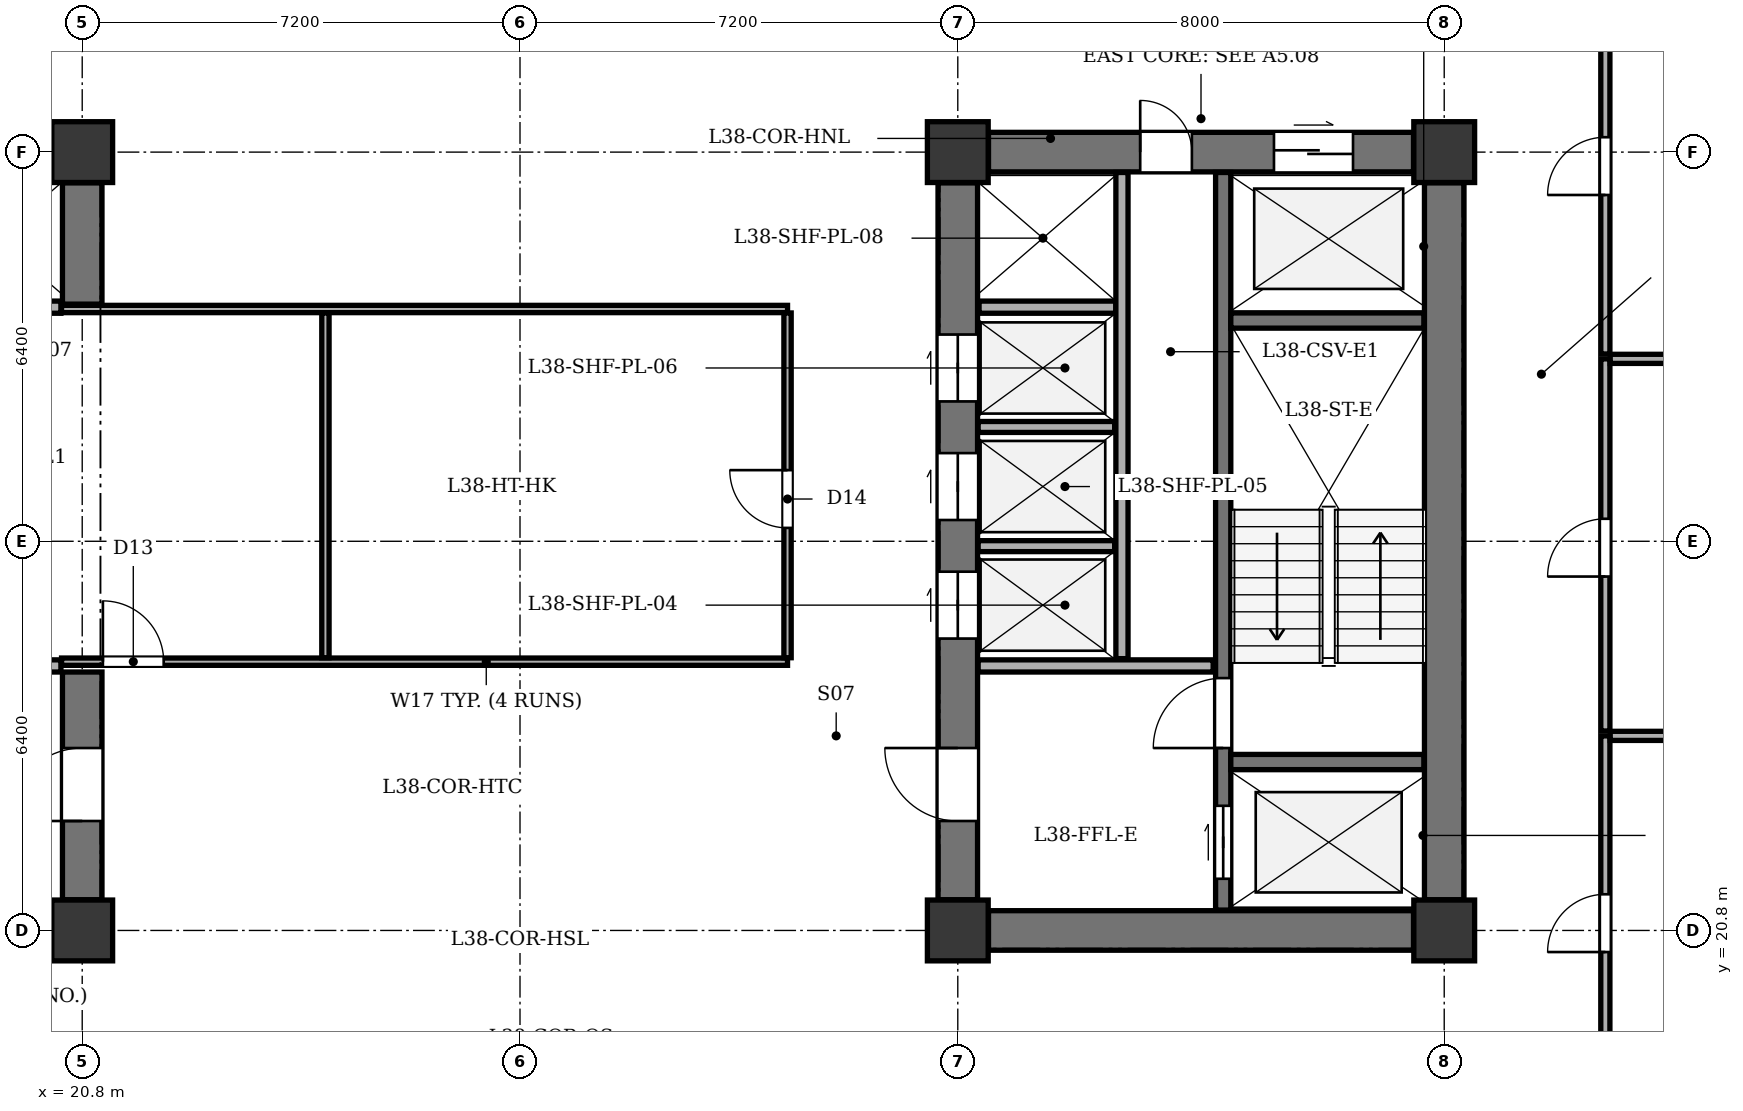
"""IFC4 building model, lengths in metres.
Left out: names, types, materials, properties, quantities, classifications, styles, units other than length and angle.
Written with IfcOpenShell. Run it as: python <this file> out.ifc"""

import sys

from ifc_helpers import new_model, si_unit, direction, frame, frame_2d, origin, origin_2d, place, context, subcontext, project, spatial, rectangle, extrude, element, fill, save


model = new_model("IFC4")
c1 = context("Model", 3, precision=1e-05, world=origin(), true_north=direction((0.0, 1.0)))
c2 = subcontext(c1, "Body", "Model", "MODEL_VIEW")
j1 = project(units=[si_unit("LENGTHUNIT", "METRE"), si_unit("PLANEANGLEUNIT", "RADIAN")], contexts=[c1])
p1 = place(None, origin())
s1 = spatial("IfcSite", under=j1, at=p1, CompositionType="ELEMENT")
p2 = place(p1, origin())
s2 = spatial("IfcBuilding", under=s1, at=p2, CompositionType="ELEMENT")
p3 = place(p2, frame((0.0, 0.0, 151.8)))
s3 = spatial("IfcBuildingStorey", under=s2, at=p3, CompositionType="ELEMENT", Elevation=151.8)
for number, where, z_axis, x_axis in (
    (1, (20.8, 20.8, 0.0), (0.0, 0.0, 1.0), (1.0, 0.0, 0.0)),
    (2, (20.8, 33.6, 0.0), (0.0, 0.0, 1.0), (1.0, 0.0, 0.0)),
    (3, (35.2, 20.8, 0.0), (0.0, 0.0, 1.0), (1.0, 0.0, 0.0)),
    (4, (43.2, 20.8, 0.0), (0.0, 0.0, 1.0), (1.0, 0.0, 0.0)),
    (5, (35.2, 33.6, 0.0), (0.0, 0.0, 1.0), (1.0, 0.0, 0.0)),
    (6, (43.2, 33.6, 0.0), (0.0, 0.0, 1.0), (1.0, 0.0, 0.0)),
):
    element("IfcColumn", number, at=place(p3, frame(where, z_axis=z_axis, x_axis=x_axis)), inside=s3, PredefinedType="COLUMN", context=c2, shape_type="SweptSolid", body=[
        extrude(rectangle(XDim=1.0, YDim=1.0, at=origin_2d()), origin(), (0.0, 0.0, 1.0), 3.5),
    ])
p4 = place(p3, frame((20.8, 21.305, 0.0), z_axis=(0.0, 0.0, 1.0), x_axis=(0.0, 1.0, 0.0)))
e7 = element("IfcWall", 7, at=p4, inside=s3, PredefinedType="SHEAR", context=c2, shape_type="SweptSolid", body=[
    extrude(rectangle(XDim=3.745, YDim=0.65, at=frame_2d((1.873, 0.0))), origin(), (0.0, 0.0, 1.0), 3.2),
])
p5 = place(p4, frame((1.295, 0.0, 0.0)))
e8 = element("IfcOpeningElement", 8, at=p5, cuts=e7, PredefinedType="OPENING", context=c2, shape_type="SweptSolid", body=[
    extrude(rectangle(XDim=1.2, YDim=2.15, at=frame_2d((0.6, 1.075))), frame((0.0, 0.335, 0.0), z_axis=(0.0, -1.0, 0.0), x_axis=(1.0, 0.0, 0.0)), (0.0, 0.0, 1.0), 0.67),
])
p6 = place(p3, frame((20.8, 31.1, 0.0), z_axis=(0.0, 0.0, 1.0), x_axis=(0.0, 1.0, 0.0)))
e9 = element("IfcWall", 9, at=p6, inside=s3, PredefinedType="SHEAR", context=c2, shape_type="SweptSolid", body=[
    extrude(rectangle(XDim=1.995, YDim=0.65, at=frame_2d((0.998, 0.0))), origin(), (0.0, 0.0, 1.0), 3.2),
])
for number, where, z_axis, x_axis in (
    (10, (16.6, 25.15, 0.0), (0.0, 0.0, 1.0), (1.0, 0.0, 0.0)),
    (11, (16.6, 31.05, 0.0), (0.0, 0.0, 1.0), (1.0, 0.0, 0.0)),
):
    element("IfcWall", number, at=place(p3, frame(where, z_axis=z_axis, x_axis=x_axis)), inside=s3, PredefinedType="SOLIDWALL", context=c2, shape_type="SweptSolid", body=[
        extrude(rectangle(XDim=3.85, YDim=0.2, at=frame_2d((1.925, 0.0))), origin(), (0.0, 0.0, 1.0), 3.2),
    ])
p7 = place(p3, frame((43.2, 21.305, 0.0), z_axis=(0.0, 0.0, 1.0), x_axis=(0.0, 1.0, 0.0)))
e12 = element("IfcWall", 12, at=p7, inside=s3, PredefinedType="SHEAR", context=c2, shape_type="SweptSolid", body=[
    extrude(rectangle(XDim=11.79, YDim=0.65, at=frame_2d((5.895, 0.0))), origin(), (0.0, 0.0, 1.0), 3.2),
])
p8 = place(p3, frame((35.705, 20.8, 0.0), z_axis=(0.0, 0.0, 1.0), x_axis=(1.0, 0.0, 0.0)))
e13 = element("IfcWall", 13, at=p8, inside=s3, PredefinedType="SHEAR", context=c2, shape_type="SweptSolid", body=[
    extrude(rectangle(XDim=6.99, YDim=0.65, at=frame_2d((3.495, 0.0))), origin(), (0.0, 0.0, 1.0), 3.2),
])
p9 = place(p3, frame((35.705, 33.6, 0.0), z_axis=(0.0, 0.0, 1.0), x_axis=(1.0, 0.0, 0.0)))
e14 = element("IfcWall", 14, at=p9, inside=s3, PredefinedType="SHEAR", context=c2, shape_type="SweptSolid", body=[
    extrude(rectangle(XDim=6.99, YDim=0.65, at=frame_2d((3.495, 0.0))), origin(), (0.0, 0.0, 1.0), 3.2),
])
p10 = place(p9, frame((4.695, 0.0, 0.0)))
e15 = element("IfcOpeningElement", 15, at=p10, cuts=e14, PredefinedType="OPENING", context=c2, shape_type="SweptSolid", body=[
    extrude(rectangle(XDim=1.3, YDim=2.15, at=frame_2d((0.65, 1.075))), frame((0.0, 0.335, 0.0), z_axis=(0.0, -1.0, 0.0), x_axis=(1.0, 0.0, 0.0)), (0.0, 0.0, 1.0), 0.67),
])
p11 = place(p9, frame((2.495, 0.0, 0.0)))
e16 = element("IfcOpeningElement", 16, at=p11, cuts=e14, PredefinedType="OPENING", context=c2, shape_type="SweptSolid", body=[
    extrude(rectangle(XDim=0.85, YDim=2.02, at=frame_2d((0.425, 1.01))), frame((0.0, 0.335, 0.0), z_axis=(0.0, -1.0, 0.0), x_axis=(1.0, 0.0, 0.0)), (0.0, 0.0, 1.0), 0.67),
])
p12 = place(p3, frame((35.2, 21.305, 0.0), z_axis=(0.0, 0.0, 1.0), x_axis=(0.0, 1.0, 0.0)))
e17 = element("IfcWall", 17, at=p12, inside=s3, PredefinedType="SHEAR", context=c2, shape_type="SweptSolid", body=[
    extrude(rectangle(XDim=11.79, YDim=0.65, at=frame_2d((5.895, 0.0))), origin(), (0.0, 0.0, 1.0), 3.2),
])
p13 = place(p12, frame((1.295, 0.0, 0.0)))
e18 = element("IfcOpeningElement", 18, at=p13, cuts=e17, PredefinedType="OPENING", context=c2, shape_type="SweptSolid", body=[
    extrude(rectangle(XDim=1.2, YDim=2.15, at=frame_2d((0.6, 1.075))), frame((0.0, 0.335, 0.0), z_axis=(0.0, -1.0, 0.0), x_axis=(1.0, 0.0, 0.0)), (0.0, 0.0, 1.0), 0.67),
])
p14 = place(p12, frame((4.295, 0.0, 0.0)))
e19 = element("IfcOpeningElement", 19, at=p14, cuts=e17, PredefinedType="OPENING", context=c2, shape_type="SweptSolid", body=[
    extrude(rectangle(XDim=1.1, YDim=2.1, at=frame_2d((0.55, 1.05))), frame((0.0, 0.335, 0.0), z_axis=(0.0, -1.0, 0.0), x_axis=(1.0, 0.0, 0.0)), (0.0, 0.0, 1.0), 0.67),
])
p15 = place(p12, frame((6.245, 0.0, 0.0)))
e20 = element("IfcOpeningElement", 20, at=p15, cuts=e17, PredefinedType="OPENING", context=c2, shape_type="SweptSolid", body=[
    extrude(rectangle(XDim=1.1, YDim=2.1, at=frame_2d((0.55, 1.05))), frame((0.0, 0.335, 0.0), z_axis=(0.0, -1.0, 0.0), x_axis=(1.0, 0.0, 0.0)), (0.0, 0.0, 1.0), 0.67),
])
p16 = place(p12, frame((8.195, 0.0, 0.0)))
e21 = element("IfcOpeningElement", 21, at=p16, cuts=e17, PredefinedType="OPENING", context=c2, shape_type="SweptSolid", body=[
    extrude(rectangle(XDim=1.1, YDim=2.1, at=frame_2d((0.55, 1.05))), frame((0.0, 0.335, 0.0), z_axis=(0.0, -1.0, 0.0), x_axis=(1.0, 0.0, 0.0)), (0.0, 0.0, 1.0), 0.67),
])
p17 = place(p3, frame((39.565, 21.135, 0.0), z_axis=(0.0, 0.0, 1.0), x_axis=(0.0, 1.0, 0.0)))
e22 = element("IfcWall", 22, at=p17, inside=s3, PredefinedType="SHEAR", context=c2, shape_type="SweptSolid", body=[
    extrude(rectangle(XDim=12.13, YDim=0.25, at=frame_2d((6.065, 0.0))), origin(), (0.0, 0.0, 1.0), 3.2),
])
p18 = place(p17, frame((0.515, 0.0, 0.0)))
e23 = element("IfcOpeningElement", 23, at=p18, cuts=e22, PredefinedType="OPENING", context=c2, shape_type="SweptSolid", body=[
    extrude(rectangle(XDim=1.2, YDim=2.15, at=frame_2d((0.6, 1.075))), frame((0.0, 0.135, 0.0), z_axis=(0.0, -1.0, 0.0), x_axis=(1.0, 0.0, 0.0)), (0.0, 0.0, 1.0), 0.27),
])
p19 = place(p17, frame((2.665, 0.0, 0.0)))
e24 = element("IfcOpeningElement", 24, at=p19, cuts=e22, PredefinedType="OPENING", context=c2, shape_type="SweptSolid", body=[
    extrude(rectangle(XDim=1.15, YDim=2.15, at=frame_2d((0.575, 1.075))), frame((0.0, 0.135, 0.0), z_axis=(0.0, -1.0, 0.0), x_axis=(1.0, 0.0, 0.0)), (0.0, 0.0, 1.0), 0.27),
])
for number, where, z_axis, x_axis in (
    (25, (39.69, 23.57, 0.0), (0.0, 0.0, 1.0), (1.0, 0.0, 0.0)),
    (26, (39.69, 30.83, 0.0), (0.0, 0.0, 1.0), (1.0, 0.0, 0.0)),
):
    element("IfcWall", number, at=place(p3, frame(where, z_axis=z_axis, x_axis=x_axis)), inside=s3, PredefinedType="SHEAR", context=c2, shape_type="SweptSolid", body=[
        extrude(rectangle(XDim=3.175, YDim=0.25, at=frame_2d((1.587, 0.0))), origin(), (0.0, 0.0, 1.0), 3.2),
    ])
p20 = place(p3, frame((35.535, 25.15, 0.0), z_axis=(0.0, 0.0, 1.0), x_axis=(1.0, 0.0, 0.0)))
e27 = element("IfcWall", 27, at=p20, inside=s3, PredefinedType="SOLIDWALL", context=c2, shape_type="SweptSolid", body=[
    extrude(rectangle(XDim=3.865, YDim=0.2, at=frame_2d((1.933, 0.0))), origin(), (0.0, 0.0, 1.0), 3.2),
])
p21 = place(p3, frame((35.55, 31.05, 0.0), z_axis=(0.0, 0.0, 1.0), x_axis=(1.0, 0.0, 0.0)))
e28 = element("IfcWall", 28, at=p21, inside=s3, PredefinedType="SOLIDWALL", context=c2, shape_type="SweptSolid", body=[
    extrude(rectangle(XDim=2.25, YDim=0.2, at=frame_2d((1.125, 0.0))), origin(), (0.0, 0.0, 1.0), 3.2),
])
p22 = place(p3, frame((37.9, 25.27, 0.0), z_axis=(0.0, 0.0, 1.0), x_axis=(0.0, 1.0, 0.0)))
e29 = element("IfcWall", 29, at=p22, inside=s3, PredefinedType="SOLIDWALL", context=c2, shape_type="SweptSolid", body=[
    extrude(rectangle(XDim=7.995, YDim=0.2, at=frame_2d((3.998, 0.0))), origin(), (0.0, 0.0, 1.0), 3.2),
])
for number, where, z_axis, x_axis in (
    (30, (35.535, 27.12, 0.0), (0.0, 0.0, 1.0), (1.0, 0.0, 0.0)),
    (31, (35.535, 29.08, 0.0), (0.0, 0.0, 1.0), (1.0, 0.0, 0.0)),
):
    element("IfcWall", number, at=place(p3, frame(where, z_axis=z_axis, x_axis=x_axis)), inside=s3, PredefinedType="PARTITIONING", context=c2, shape_type="SweptSolid", body=[
        extrude(rectangle(XDim=2.245, YDim=0.18, at=frame_2d((1.123, 0.0))), origin(), (0.0, 0.0, 1.0), 3.2),
    ])
p23 = place(p3, frame((20.46, 25.22, 0.0), z_axis=(0.0, 0.0, 1.0), x_axis=(1.0, 0.0, 0.0)))
e32 = element("IfcWall", 32, at=p23, inside=s3, PredefinedType="PARTITIONING", context=c2, shape_type="SweptSolid", body=[
    extrude(rectangle(XDim=11.94, YDim=0.12, at=frame_2d((5.97, 0.0))), origin(), (0.0, 0.0, 1.0), 3.2),
])
p24 = place(p23, frame((0.68, 0.0, 0.0)))
e33 = element("IfcOpeningElement", 33, at=p24, cuts=e32, PredefinedType="OPENING", context=c2, shape_type="SweptSolid", body=[
    extrude(rectangle(XDim=1.0, YDim=2.1, at=frame_2d((0.5, 1.05))), frame((0.0, 0.07, 0.0), z_axis=(0.0, -1.0, 0.0), x_axis=(1.0, 0.0, 0.0)), (0.0, 0.0, 1.0), 0.14),
])
p25 = place(p3, frame((20.46, 31.02, 0.0), z_axis=(0.0, 0.0, 1.0), x_axis=(1.0, 0.0, 0.0)))
e34 = element("IfcWall", 34, at=p25, inside=s3, PredefinedType="PARTITIONING", context=c2, shape_type="SweptSolid", body=[
    extrude(rectangle(XDim=11.94, YDim=0.12, at=frame_2d((5.97, 0.0))), origin(), (0.0, 0.0, 1.0), 3.2),
])
p26 = place(p3, frame((32.4, 25.285, 0.0), z_axis=(0.0, 0.0, 1.0), x_axis=(0.0, 1.0, 0.0)))
e35 = element("IfcWall", 35, at=p26, inside=s3, PredefinedType="PARTITIONING", context=c2, shape_type="SweptSolid", body=[
    extrude(rectangle(XDim=5.67, YDim=0.12, at=frame_2d((2.835, 0.0))), origin(), (0.0, 0.0, 1.0), 3.2),
])
p27 = place(p26, frame((2.135, 0.0, 0.0)))
e36 = element("IfcOpeningElement", 36, at=p27, cuts=e35, PredefinedType="OPENING", context=c2, shape_type="SweptSolid", body=[
    extrude(rectangle(XDim=0.95, YDim=2.1, at=frame_2d((0.475, 1.05))), frame((0.0, 0.07, 0.0), z_axis=(0.0, -1.0, 0.0), x_axis=(1.0, 0.0, 0.0)), (0.0, 0.0, 1.0), 0.14),
])
p28 = place(p3, frame((24.8, 25.285, 0.0), z_axis=(0.0, 0.0, 1.0), x_axis=(0.0, 1.0, 0.0)))
e37 = element("IfcWall", 37, at=p28, inside=s3, PredefinedType="PARTITIONING", context=c2, shape_type="SweptSolid", body=[
    extrude(rectangle(XDim=5.67, YDim=0.12, at=frame_2d((2.835, 0.0))), origin(), (0.0, 0.0, 1.0), 3.2),
])
p29 = place(p3, frame((45.85, 17.93, 0.0), z_axis=(0.0, 0.0, 1.0), x_axis=(0.0, 1.0, 0.0)))
e38 = element("IfcWall", 38, at=p29, inside=s3, PredefinedType="PARTITIONING", context=c2, shape_type="SweptSolid", body=[
    extrude(rectangle(XDim=6.07, YDim=0.15, at=frame_2d((3.035, 0.0))), origin(), (0.0, 0.0, 1.0), 3.2),
])
p30 = place(p29, frame((2.515, 0.0, 0.0)))
e39 = element("IfcOpeningElement", 39, at=p30, cuts=e38, PredefinedType="OPENING", context=c2, shape_type="SweptSolid", body=[
    extrude(rectangle(XDim=0.95, YDim=2.1, at=frame_2d((0.475, 1.05))), frame((0.0, 0.085, 0.0), z_axis=(0.0, -1.0, 0.0), x_axis=(1.0, 0.0, 0.0)), (0.0, 0.0, 1.0), 0.17),
])
p31 = place(p3, frame((45.93, 24.0, 0.0), z_axis=(0.0, 0.0, 1.0), x_axis=(1.0, 0.0, 0.0)))
e40 = element("IfcWall", 40, at=p31, inside=s3, PredefinedType="PARTITIONING", context=c2, shape_type="SweptSolid", body=[
    extrude(rectangle(XDim=9.395, YDim=0.15, at=frame_2d((4.698, 0.0))), origin(), (0.0, 0.0, 1.0), 3.2),
])
p32 = place(p3, frame((45.85, 24.08, 0.0), z_axis=(0.0, 0.0, 1.0), x_axis=(0.0, 1.0, 0.0)))
e41 = element("IfcWall", 41, at=p32, inside=s3, PredefinedType="PARTITIONING", context=c2, shape_type="SweptSolid", body=[
    extrude(rectangle(XDim=6.12, YDim=0.15, at=frame_2d((3.06, 0.0))), origin(), (0.0, 0.0, 1.0), 3.2),
])
p33 = place(p32, frame((2.54, 0.0, 0.0)))
e42 = element("IfcOpeningElement", 42, at=p33, cuts=e41, PredefinedType="OPENING", context=c2, shape_type="SweptSolid", body=[
    extrude(rectangle(XDim=0.95, YDim=2.1, at=frame_2d((0.475, 1.05))), frame((0.0, 0.085, 0.0), z_axis=(0.0, -1.0, 0.0), x_axis=(1.0, 0.0, 0.0)), (0.0, 0.0, 1.0), 0.17),
])
p34 = place(p3, frame((45.93, 30.2, 0.0), z_axis=(0.0, 0.0, 1.0), x_axis=(1.0, 0.0, 0.0)))
e43 = element("IfcWall", 43, at=p34, inside=s3, PredefinedType="PARTITIONING", context=c2, shape_type="SweptSolid", body=[
    extrude(rectangle(XDim=9.395, YDim=0.15, at=frame_2d((4.698, 0.0))), origin(), (0.0, 0.0, 1.0), 3.2),
])
p35 = place(p3, frame((45.85, 30.28, 0.0), z_axis=(0.0, 0.0, 1.0), x_axis=(0.0, 1.0, 0.0)))
e44 = element("IfcWall", 44, at=p35, inside=s3, PredefinedType="PARTITIONING", context=c2, shape_type="SweptSolid", body=[
    extrude(rectangle(XDim=6.19, YDim=0.15, at=frame_2d((3.095, 0.0))), origin(), (0.0, 0.0, 1.0), 3.2),
])
p36 = place(p35, frame((2.615, 0.0, 0.0)))
e45 = element("IfcOpeningElement", 45, at=p36, cuts=e44, PredefinedType="OPENING", context=c2, shape_type="SweptSolid", body=[
    extrude(rectangle(XDim=0.95, YDim=2.1, at=frame_2d((0.475, 1.05))), frame((0.0, 0.085, 0.0), z_axis=(0.0, -1.0, 0.0), x_axis=(1.0, 0.0, 0.0)), (0.0, 0.0, 1.0), 0.17),
])
p37 = place(p5, origin())
e46 = element("IfcDoor", 46, at=p37, inside=s3, OperationType="SINGLE_SWING_LEFT", PredefinedType="DOOR", context=c2, shape_type="SweptSolid", body=[
    extrude(rectangle(XDim=1.2, YDim=2.15, at=frame_2d((0.6, 1.075))), frame((0.0, 0.025, 0.0), z_axis=(0.0, -1.0, 0.0), x_axis=(1.0, 0.0, 0.0)), (0.0, 0.0, 1.0), 0.05),
])
fill(e8, e46)
p38 = place(p10, origin())
e47 = element("IfcDoor", 47, at=p38, inside=s3, OperationType="DOUBLE_DOOR_SLIDING", PredefinedType="DOOR", context=c2, shape_type="SweptSolid", body=[
    extrude(rectangle(XDim=1.3, YDim=2.15, at=frame_2d((0.65, 1.075))), frame((0.0, 0.025, 0.0), z_axis=(0.0, -1.0, 0.0), x_axis=(1.0, 0.0, 0.0)), (0.0, 0.0, 1.0), 0.05),
])
fill(e15, e47)
p39 = place(p11, origin())
e48 = element("IfcDoor", 48, at=p39, inside=s3, OperationType="SINGLE_SWING_LEFT", PredefinedType="DOOR", context=c2, shape_type="SweptSolid", body=[
    extrude(rectangle(XDim=0.85, YDim=2.02, at=frame_2d((0.425, 1.01))), frame((0.0, 0.025, 0.0), z_axis=(0.0, -1.0, 0.0), x_axis=(1.0, 0.0, 0.0)), (0.0, 0.0, 1.0), 0.05),
])
fill(e16, e48)
p40 = place(p13, origin())
e49 = element("IfcDoor", 49, at=p40, inside=s3, OperationType="SINGLE_SWING_RIGHT", PredefinedType="DOOR", context=c2, shape_type="SweptSolid", body=[
    extrude(rectangle(XDim=1.2, YDim=2.15, at=frame_2d((0.6, 1.075))), frame((0.0, 0.025, 0.0), z_axis=(0.0, -1.0, 0.0), x_axis=(1.0, 0.0, 0.0)), (0.0, 0.0, 1.0), 0.05),
])
fill(e18, e49)
p41 = place(p14, origin())
e50 = element("IfcDoor", 50, at=p41, inside=s3, OperationType="DOUBLE_DOOR_SLIDING", PredefinedType="DOOR", context=c2, shape_type="SweptSolid", body=[
    extrude(rectangle(XDim=1.1, YDim=2.1, at=frame_2d((0.55, 1.05))), frame((0.0, 0.025, 0.0), z_axis=(0.0, -1.0, 0.0), x_axis=(1.0, 0.0, 0.0)), (0.0, 0.0, 1.0), 0.05),
])
fill(e19, e50)
p42 = place(p15, origin())
e51 = element("IfcDoor", 51, at=p42, inside=s3, OperationType="DOUBLE_DOOR_SLIDING", PredefinedType="DOOR", context=c2, shape_type="SweptSolid", body=[
    extrude(rectangle(XDim=1.1, YDim=2.1, at=frame_2d((0.55, 1.05))), frame((0.0, 0.025, 0.0), z_axis=(0.0, -1.0, 0.0), x_axis=(1.0, 0.0, 0.0)), (0.0, 0.0, 1.0), 0.05),
])
fill(e20, e51)
p43 = place(p16, origin())
e52 = element("IfcDoor", 52, at=p43, inside=s3, OperationType="DOUBLE_DOOR_SLIDING", PredefinedType="DOOR", context=c2, shape_type="SweptSolid", body=[
    extrude(rectangle(XDim=1.1, YDim=2.1, at=frame_2d((0.55, 1.05))), frame((0.0, 0.025, 0.0), z_axis=(0.0, -1.0, 0.0), x_axis=(1.0, 0.0, 0.0)), (0.0, 0.0, 1.0), 0.05),
])
fill(e21, e52)
p44 = place(p18, origin())
e53 = element("IfcDoor", 53, at=p44, inside=s3, OperationType="DOUBLE_DOOR_SLIDING", PredefinedType="DOOR", context=c2, shape_type="SweptSolid", body=[
    extrude(rectangle(XDim=1.2, YDim=2.15, at=frame_2d((0.6, 1.075))), frame((0.0, 0.025, 0.0), z_axis=(0.0, -1.0, 0.0), x_axis=(1.0, 0.0, 0.0)), (0.0, 0.0, 1.0), 0.05),
])
fill(e23, e53)
p45 = place(p19, origin())
e54 = element("IfcDoor", 54, at=p45, inside=s3, OperationType="SINGLE_SWING_LEFT", PredefinedType="DOOR", context=c2, shape_type="SweptSolid", body=[
    extrude(rectangle(XDim=1.15, YDim=2.15, at=frame_2d((0.575, 1.075))), frame((0.0, 0.025, 0.0), z_axis=(0.0, -1.0, 0.0), x_axis=(1.0, 0.0, 0.0)), (0.0, 0.0, 1.0), 0.05),
])
fill(e24, e54)
p46 = place(p24, origin())
e55 = element("IfcDoor", 55, at=p46, inside=s3, OperationType="SINGLE_SWING_LEFT", PredefinedType="DOOR", context=c2, shape_type="SweptSolid", body=[
    extrude(rectangle(XDim=1.0, YDim=2.1, at=frame_2d((0.5, 1.05))), frame((0.0, 0.025, 0.0), z_axis=(0.0, -1.0, 0.0), x_axis=(1.0, 0.0, 0.0)), (0.0, 0.0, 1.0), 0.05),
])
fill(e33, e55)
p47 = place(p27, origin())
e56 = element("IfcDoor", 56, at=p47, inside=s3, OperationType="SINGLE_SWING_RIGHT", PredefinedType="DOOR", context=c2, shape_type="SweptSolid", body=[
    extrude(rectangle(XDim=0.95, YDim=2.1, at=frame_2d((0.475, 1.05))), frame((0.0, 0.025, 0.0), z_axis=(0.0, -1.0, 0.0), x_axis=(1.0, 0.0, 0.0)), (0.0, 0.0, 1.0), 0.05),
])
fill(e36, e56)
p48 = place(p30, origin())
e57 = element("IfcDoor", 57, at=p48, inside=s3, OperationType="SINGLE_SWING_LEFT", PredefinedType="DOOR", context=c2, shape_type="SweptSolid", body=[
    extrude(rectangle(XDim=0.95, YDim=2.1, at=frame_2d((0.475, 1.05))), frame((0.0, 0.025, 0.0), z_axis=(0.0, -1.0, 0.0), x_axis=(1.0, 0.0, 0.0)), (0.0, 0.0, 1.0), 0.05),
])
fill(e39, e57)
p49 = place(p33, origin())
e58 = element("IfcDoor", 58, at=p49, inside=s3, OperationType="SINGLE_SWING_LEFT", PredefinedType="DOOR", context=c2, shape_type="SweptSolid", body=[
    extrude(rectangle(XDim=0.95, YDim=2.1, at=frame_2d((0.475, 1.05))), frame((0.0, 0.025, 0.0), z_axis=(0.0, -1.0, 0.0), x_axis=(1.0, 0.0, 0.0)), (0.0, 0.0, 1.0), 0.05),
])
fill(e42, e58)
p50 = place(p36, origin())
e59 = element("IfcDoor", 59, at=p50, inside=s3, OperationType="SINGLE_SWING_LEFT", PredefinedType="DOOR", context=c2, shape_type="SweptSolid", body=[
    extrude(rectangle(XDim=0.95, YDim=2.1, at=frame_2d((0.475, 1.05))), frame((0.0, 0.025, 0.0), z_axis=(0.0, -1.0, 0.0), x_axis=(1.0, 0.0, 0.0)), (0.0, 0.0, 1.0), 0.05),
])
fill(e45, e59)
save(model, sys.argv[1])
